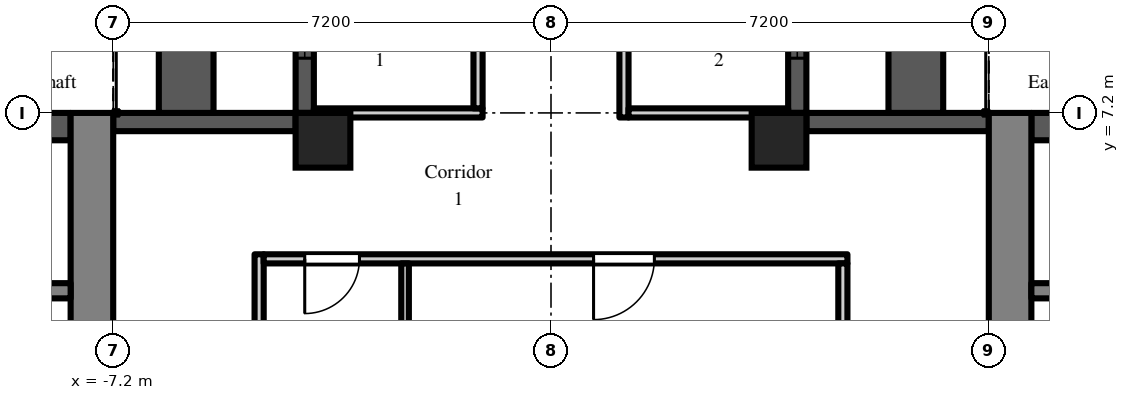
"""IFC4 building model, lengths in metres.
Left out: names, types, materials, properties, quantities, classifications, styles, units other than length and angle.
Written with IfcOpenShell. Run it as: python <this file> out.ifc"""

import sys

from ifc_helpers import new_model, si_unit, direction, frame, frame_2d, origin, origin_2d, place, context, subcontext, project, spatial, rectangle, extrude, element, fill, save


model = new_model("IFC4")
c1 = context("Model", 3, precision=1e-05, world=origin(), true_north=direction((0.0, 1.0)))
c2 = subcontext(c1, "Body", "Model", "MODEL_VIEW")
j1 = project(units=[si_unit("LENGTHUNIT", "METRE"), si_unit("PLANEANGLEUNIT", "RADIAN")], contexts=[c1])
p1 = place(None, origin())
s1 = spatial("IfcSite", under=j1, at=p1, CompositionType="ELEMENT")
p2 = place(p1, origin())
s2 = spatial("IfcBuilding", under=s1, at=p2, CompositionType="ELEMENT")
p3 = place(p2, frame((0.0, 0.0, 147.3)))
s3 = spatial("IfcBuildingStorey", under=s2, at=p3, CompositionType="ELEMENT", Elevation=147.3)
for number, where, z_axis, x_axis in (
    (1, (-3.75, 6.75, 0.0), (0.0, 0.0, 1.0), (1.0, 0.0, 0.0)),
    (2, (3.75, 6.75, 0.0), (0.0, 0.0, 1.0), (1.0, 0.0, 0.0)),
):
    element("IfcColumn", number, at=place(p3, frame(where, z_axis=z_axis, x_axis=x_axis)), inside=s3, PredefinedType="COLUMN", context=c2, shape_type="SweptSolid", body=[
        extrude(rectangle(XDim=0.9, YDim=0.9, at=origin_2d()), origin(), (0.0, 0.0, 1.0), 3.0),
    ])
p4 = place(p3, frame((7.2, 7.05, 0.0), z_axis=(0.0, 0.0, 1.0), x_axis=(-1.0, 0.0, 0.0)))
e3 = element("IfcWall", 3, at=p4, inside=s3, PredefinedType="SOLIDWALL", context=c2, shape_type="SweptSolid", body=[
    extrude(rectangle(XDim=3.0, YDim=0.3, at=frame_2d((1.5, 0.0))), origin(), (0.0, 0.0, 1.0), 2.2),
])
p5 = place(p3, frame((4.05, 7.2, 0.0), z_axis=(0.0, 0.0, 1.0), x_axis=(0.0, 1.0, 0.0)))
e4 = element("IfcWall", 4, at=p5, inside=s3, PredefinedType="SOLIDWALL", context=c2, shape_type="SweptSolid", body=[
    extrude(rectangle(XDim=7.2, YDim=0.3, at=frame_2d((3.6, 0.0))), origin(), (0.0, 0.0, 1.0), 2.2),
])
p6 = place(p5, frame((3.0, 0.0, 0.0)))
e5 = element("IfcOpeningElement", 5, at=p6, cuts=e4, PredefinedType="OPENING", context=c2, shape_type="SweptSolid", body=[
    extrude(rectangle(XDim=1.2, YDim=2.05, at=frame_2d((0.6, 1.025))), frame((0.0, 0.16, 0.0), z_axis=(0.0, -1.0, 0.0), x_axis=(1.0, 0.0, 0.0)), (0.0, 0.0, 1.0), 0.32),
])
p7 = place(p5, frame((0.9, 0.0, 0.2)))
e6 = element("IfcOpeningElement", 6, at=p7, cuts=e4, PredefinedType="OPENING", context=c2, shape_type="SweptSolid", body=[
    extrude(rectangle(XDim=1.8, YDim=1.85, at=frame_2d((0.9, 0.925))), frame((0.0, 0.16, 0.0), z_axis=(0.0, -1.0, 0.0), x_axis=(1.0, 0.0, 0.0)), (0.0, 0.0, 1.0), 0.32),
])
p8 = place(p5, frame((4.5, 0.0, 0.2)))
e7 = element("IfcOpeningElement", 7, at=p8, cuts=e4, PredefinedType="OPENING", context=c2, shape_type="SweptSolid", body=[
    extrude(rectangle(XDim=1.8, YDim=1.85, at=frame_2d((0.9, 0.925))), frame((0.0, 0.16, 0.0), z_axis=(0.0, -1.0, 0.0), x_axis=(1.0, 0.0, 0.0)), (0.0, 0.0, 1.0), 0.32),
])
p9 = place(p3, frame((-4.05, 14.4, 0.0), z_axis=(0.0, 0.0, 1.0), x_axis=(0.0, -1.0, 0.0)))
e8 = element("IfcWall", 8, at=p9, inside=s3, PredefinedType="SOLIDWALL", context=c2, shape_type="SweptSolid", body=[
    extrude(rectangle(XDim=7.2, YDim=0.3, at=frame_2d((3.6, 0.0))), origin(), (0.0, 0.0, 1.0), 2.2),
])
p10 = place(p9, frame((3.0, 0.0, 0.0)))
e9 = element("IfcOpeningElement", 9, at=p10, cuts=e8, PredefinedType="OPENING", context=c2, shape_type="SweptSolid", body=[
    extrude(rectangle(XDim=1.2, YDim=2.05, at=frame_2d((0.6, 1.025))), frame((0.0, 0.16, 0.0), z_axis=(0.0, -1.0, 0.0), x_axis=(1.0, 0.0, 0.0)), (0.0, 0.0, 1.0), 0.32),
])
p11 = place(p9, frame((0.9, 0.0, 0.2)))
e10 = element("IfcOpeningElement", 10, at=p11, cuts=e8, PredefinedType="OPENING", context=c2, shape_type="SweptSolid", body=[
    extrude(rectangle(XDim=1.8, YDim=1.85, at=frame_2d((0.9, 0.925))), frame((0.0, 0.16, 0.0), z_axis=(0.0, -1.0, 0.0), x_axis=(1.0, 0.0, 0.0)), (0.0, 0.0, 1.0), 0.32),
])
p12 = place(p9, frame((4.5, 0.0, 0.2)))
e11 = element("IfcOpeningElement", 11, at=p12, cuts=e8, PredefinedType="OPENING", context=c2, shape_type="SweptSolid", body=[
    extrude(rectangle(XDim=1.8, YDim=1.85, at=frame_2d((0.9, 0.925))), frame((0.0, 0.16, 0.0), z_axis=(0.0, -1.0, 0.0), x_axis=(1.0, 0.0, 0.0)), (0.0, 0.0, 1.0), 0.32),
])
p13 = place(p3, frame((-4.2, 7.05, 0.0), z_axis=(0.0, 0.0, 1.0), x_axis=(-1.0, 0.0, 0.0)))
e12 = element("IfcWall", 12, at=p13, inside=s3, PredefinedType="SOLIDWALL", context=c2, shape_type="SweptSolid", body=[
    extrude(rectangle(XDim=3.0, YDim=0.3, at=frame_2d((1.5, 0.0))), origin(), (0.0, 0.0, 1.0), 2.2),
])
for number, where, z_axis, x_axis in (
    (13, (6.0, 7.2, 0.0), (0.0, 0.0, 1.0), (0.0, 1.0, 0.0)),
    (14, (-6.0, 7.2, 0.0), (0.0, 0.0, 1.0), (0.0, 1.0, 0.0)),
):
    element("IfcWall", number, at=place(p3, frame(where, z_axis=z_axis, x_axis=x_axis)), inside=s3, PredefinedType="PARAPET", context=c2, shape_type="SweptSolid", body=[
        extrude(rectangle(XDim=7.2, YDim=0.9, at=frame_2d((3.6, 0.0))), origin(), (0.0, 0.0, 1.0), 0.8),
    ])
p14 = place(p3, frame((7.55, -7.2, 0.0), z_axis=(0.0, 0.0, 1.0), x_axis=(0.0, 1.0, 0.0)))
e15 = element("IfcWall", 15, at=p14, inside=s3, PredefinedType="SHEAR", context=c2, shape_type="SweptSolid", body=[
    extrude(rectangle(XDim=14.4, YDim=0.7, at=frame_2d((7.2, 0.0))), origin(), (0.0, 0.0, 1.0), 2.6),
])
p15 = place(p14, frame((6.0, 0.0, 0.0)))
e16 = element("IfcOpeningElement", 16, at=p15, cuts=e15, PredefinedType="OPENING", context=c2, shape_type="SweptSolid", body=[
    extrude(rectangle(XDim=2.4, YDim=2.2, at=frame_2d((1.2, 1.1))), frame((0.0, 0.36, 0.0), z_axis=(0.0, -1.0, 0.0), x_axis=(1.0, 0.0, 0.0)), (0.0, 0.0, 1.0), 0.72),
])
p16 = place(p3, frame((7.9, 6.975, 0.0), z_axis=(0.0, 0.0, 1.0), x_axis=(1.0, 0.0, 0.0)))
e17 = element("IfcWall", 17, at=p16, inside=s3, PredefinedType="SHEAR", context=c2, shape_type="SweptSolid", body=[
    extrude(rectangle(XDim=12.95, YDim=0.45, at=frame_2d((6.475, 0.0))), origin(), (0.0, 0.0, 1.0), 2.6),
])
p17 = place(p3, frame((7.9, 4.275, 0.0), z_axis=(0.0, 0.0, 1.0), x_axis=(1.0, 0.0, 0.0)))
e18 = element("IfcWall", 18, at=p17, inside=s3, PredefinedType="SHEAR", context=c2, shape_type="SweptSolid", body=[
    extrude(rectangle(XDim=1.95, YDim=0.25, at=frame_2d((0.975, 0.0))), origin(), (0.0, 0.0, 1.0), 2.6),
])
p18 = place(p3, frame((-7.55, -7.2, 0.0), z_axis=(0.0, 0.0, 1.0), x_axis=(0.0, 1.0, 0.0)))
e19 = element("IfcWall", 19, at=p18, inside=s3, PredefinedType="SHEAR", context=c2, shape_type="SweptSolid", body=[
    extrude(rectangle(XDim=14.4, YDim=0.7, at=frame_2d((7.2, 0.0))), origin(), (0.0, 0.0, 1.0), 2.6),
])
p19 = place(p18, frame((6.0, 0.0, 0.0)))
e20 = element("IfcOpeningElement", 20, at=p19, cuts=e19, PredefinedType="OPENING", context=c2, shape_type="SweptSolid", body=[
    extrude(rectangle(XDim=2.4, YDim=2.2, at=frame_2d((1.2, 1.1))), frame((0.0, 0.36, 0.0), z_axis=(0.0, -1.0, 0.0), x_axis=(1.0, 0.0, 0.0)), (0.0, 0.0, 1.0), 0.72),
])
p20 = place(p3, frame((-7.9, 6.975, 0.0), z_axis=(0.0, 0.0, 1.0), x_axis=(-1.0, 0.0, 0.0)))
e21 = element("IfcWall", 21, at=p20, inside=s3, PredefinedType="SHEAR", context=c2, shape_type="SweptSolid", body=[
    extrude(rectangle(XDim=12.95, YDim=0.45, at=frame_2d((6.475, 0.0))), origin(), (0.0, 0.0, 1.0), 2.6),
])
p21 = place(p3, frame((-7.9, 4.275, 0.0), z_axis=(0.0, 0.0, 1.0), x_axis=(-1.0, 0.0, 0.0)))
e22 = element("IfcWall", 22, at=p21, inside=s3, PredefinedType="SHEAR", context=c2, shape_type="SweptSolid", body=[
    extrude(rectangle(XDim=1.95, YDim=0.25, at=frame_2d((0.975, 0.0))), origin(), (0.0, 0.0, 1.0), 2.6),
])
p22 = place(p3, frame((-4.8, -4.875, 0.0), z_axis=(0.0, 0.0, 1.0), x_axis=(0.0, 1.0, 0.0)))
e23 = element("IfcWall", 23, at=p22, inside=s3, PredefinedType="PARTITIONING", context=c2, shape_type="SweptSolid", body=[
    extrude(rectangle(XDim=9.75, YDim=0.15, at=frame_2d((4.875, 0.0))), origin(), (0.0, 0.0, 1.0), 2.6),
])
p23 = place(p22, frame((5.625, 0.0, 0.0)))
e24 = element("IfcOpeningElement", 24, at=p23, cuts=e23, PredefinedType="OPENING", context=c2, shape_type="SweptSolid", body=[
    extrude(rectangle(XDim=0.9, YDim=2.1, at=frame_2d((0.45, 1.05))), frame((0.0, 0.085, 0.0), z_axis=(0.0, -1.0, 0.0), x_axis=(1.0, 0.0, 0.0)), (0.0, 0.0, 1.0), 0.17),
])
p24 = place(p22, frame((2.025, 0.0, 0.0)))
e25 = element("IfcOpeningElement", 25, at=p24, cuts=e23, PredefinedType="OPENING", context=c2, shape_type="SweptSolid", body=[
    extrude(rectangle(XDim=0.9, YDim=2.1, at=frame_2d((0.45, 1.05))), frame((0.0, 0.085, 0.0), z_axis=(0.0, -1.0, 0.0), x_axis=(1.0, 0.0, 0.0)), (0.0, 0.0, 1.0), 0.17),
])
p25 = place(p3, frame((-4.725, 4.8, 0.0), z_axis=(0.0, 0.0, 1.0), x_axis=(1.0, 0.0, 0.0)))
e26 = element("IfcWall", 26, at=p25, inside=s3, PredefinedType="PARTITIONING", context=c2, shape_type="SweptSolid", body=[
    extrude(rectangle(XDim=9.6, YDim=0.15, at=frame_2d((4.8, 0.0))), origin(), (0.0, 0.0, 1.0), 2.6),
])
p26 = place(p25, frame((0.675, 0.0, 0.0)))
e27 = element("IfcOpeningElement", 27, at=p26, cuts=e26, PredefinedType="OPENING", context=c2, shape_type="SweptSolid", body=[
    extrude(rectangle(XDim=0.9, YDim=2.1, at=frame_2d((0.45, 1.05))), frame((0.0, 0.085, 0.0), z_axis=(0.0, -1.0, 0.0), x_axis=(1.0, 0.0, 0.0)), (0.0, 0.0, 1.0), 0.17),
])
p27 = place(p25, frame((5.425, 0.0, 0.0)))
e28 = element("IfcOpeningElement", 28, at=p27, cuts=e26, PredefinedType="OPENING", context=c2, shape_type="SweptSolid", body=[
    extrude(rectangle(XDim=1.0, YDim=2.1, at=frame_2d((0.5, 1.05))), frame((0.0, 0.085, 0.0), z_axis=(0.0, -1.0, 0.0), x_axis=(1.0, 0.0, 0.0)), (0.0, 0.0, 1.0), 0.17),
])
p28 = place(p3, frame((-3.9, 7.2, 0.0), z_axis=(0.0, 0.0, 1.0), x_axis=(1.0, 0.0, 0.0)))
e29 = element("IfcWall", 29, at=p28, inside=s3, PredefinedType="PARTITIONING", context=c2, shape_type="SweptSolid", body=[
    extrude(rectangle(XDim=2.775, YDim=0.15, at=frame_2d((1.387, 0.0))), origin(), (0.0, 0.0, 1.0), 2.6),
])
p29 = place(p3, frame((-2.4, 0.075, 0.0), z_axis=(0.0, 0.0, 1.0), x_axis=(0.0, 1.0, 0.0)))
e30 = element("IfcWall", 30, at=p29, inside=s3, PredefinedType="PARTITIONING", context=c2, shape_type="SweptSolid", body=[
    extrude(rectangle(XDim=4.65, YDim=0.125, at=frame_2d((2.325, 0.0))), origin(), (0.0, 0.0, 1.0), 2.6),
])
p30 = place(p3, frame((-1.2, 7.275, 0.0), z_axis=(0.0, 0.0, 1.0), x_axis=(0.0, 1.0, 0.0)))
e31 = element("IfcWall", 31, at=p30, inside=s3, PredefinedType="PARTITIONING", context=c2, shape_type="SweptSolid", body=[
    extrude(rectangle(XDim=10.65, YDim=0.15, at=frame_2d((5.325, 0.0))), origin(), (0.0, 0.0, 1.0), 2.6),
])
p31 = place(p30, frame((5.275, 0.0, 0.0)))
e32 = element("IfcOpeningElement", 32, at=p31, cuts=e31, PredefinedType="OPENING", context=c2, shape_type="SweptSolid", body=[
    extrude(rectangle(XDim=0.9, YDim=2.1, at=frame_2d((0.45, 1.05))), frame((0.0, 0.085, 0.0), z_axis=(0.0, -1.0, 0.0), x_axis=(1.0, 0.0, 0.0)), (0.0, 0.0, 1.0), 0.17),
])
p32 = place(p30, frame((1.675, 0.0, 0.0)))
e33 = element("IfcOpeningElement", 33, at=p32, cuts=e31, PredefinedType="OPENING", context=c2, shape_type="SweptSolid", body=[
    extrude(rectangle(XDim=0.9, YDim=2.1, at=frame_2d((0.45, 1.05))), frame((0.0, 0.085, 0.0), z_axis=(0.0, -1.0, 0.0), x_axis=(1.0, 0.0, 0.0)), (0.0, 0.0, 1.0), 0.17),
])
p33 = place(p30, frame((7.725, 0.0, 0.0)))
e34 = element("IfcOpeningElement", 34, at=p33, cuts=e31, PredefinedType="OPENING", context=c2, shape_type="SweptSolid", body=[
    extrude(rectangle(XDim=1.0, YDim=2.1, at=frame_2d((0.5, 1.05))), frame((0.0, 0.085, 0.0), z_axis=(0.0, -1.0, 0.0), x_axis=(1.0, 0.0, 0.0)), (0.0, 0.0, 1.0), 0.17),
])
p34 = place(p3, frame((1.2, 7.125, 0.0), z_axis=(0.0, 0.0, 1.0), x_axis=(0.0, 1.0, 0.0)))
e35 = element("IfcWall", 35, at=p34, inside=s3, PredefinedType="PARTITIONING", context=c2, shape_type="SweptSolid", body=[
    extrude(rectangle(XDim=10.8, YDim=0.15, at=frame_2d((5.4, 0.0))), origin(), (0.0, 0.0, 1.0), 2.6),
])
p35 = place(p34, frame((5.425, 0.0, 0.0)))
e36 = element("IfcOpeningElement", 36, at=p35, cuts=e35, PredefinedType="OPENING", context=c2, shape_type="SweptSolid", body=[
    extrude(rectangle(XDim=0.9, YDim=2.1, at=frame_2d((0.45, 1.05))), frame((0.0, 0.085, 0.0), z_axis=(0.0, -1.0, 0.0), x_axis=(1.0, 0.0, 0.0)), (0.0, 0.0, 1.0), 0.17),
])
p36 = place(p34, frame((1.825, 0.0, 0.0)))
e37 = element("IfcOpeningElement", 37, at=p36, cuts=e35, PredefinedType="OPENING", context=c2, shape_type="SweptSolid", body=[
    extrude(rectangle(XDim=0.9, YDim=2.1, at=frame_2d((0.45, 1.05))), frame((0.0, 0.085, 0.0), z_axis=(0.0, -1.0, 0.0), x_axis=(1.0, 0.0, 0.0)), (0.0, 0.0, 1.0), 0.17),
])
p37 = place(p34, frame((7.475, 0.0, 0.0)))
e38 = element("IfcOpeningElement", 38, at=p37, cuts=e35, PredefinedType="OPENING", context=c2, shape_type="SweptSolid", body=[
    extrude(rectangle(XDim=1.0, YDim=2.1, at=frame_2d((0.5, 1.05))), frame((0.0, 0.085, 0.0), z_axis=(0.0, -1.0, 0.0), x_axis=(1.0, 0.0, 0.0)), (0.0, 0.0, 1.0), 0.17),
])
p38 = place(p3, frame((1.275, 7.2, 0.0), z_axis=(0.0, 0.0, 1.0), x_axis=(1.0, 0.0, 0.0)))
e39 = element("IfcWall", 39, at=p38, inside=s3, PredefinedType="PARTITIONING", context=c2, shape_type="SweptSolid", body=[
    extrude(rectangle(XDim=2.625, YDim=0.15, at=frame_2d((1.312, 0.0))), origin(), (0.0, 0.0, 1.0), 2.6),
])
p39 = place(p3, frame((4.8, -4.725, 0.0), z_axis=(0.0, 0.0, 1.0), x_axis=(0.0, 1.0, 0.0)))
e40 = element("IfcWall", 40, at=p39, inside=s3, PredefinedType="PARTITIONING", context=c2, shape_type="SweptSolid", body=[
    extrude(rectangle(XDim=9.45, YDim=0.15, at=frame_2d((4.725, 0.0))), origin(), (0.0, 0.0, 1.0), 2.6),
])
p40 = place(p7, origin())
e41 = element("IfcWindow", 41, at=p40, inside=s3, PartitioningType="SINGLE_PANEL", PredefinedType="WINDOW", context=c2, shape_type="SweptSolid", body=[
    extrude(rectangle(XDim=1.8, YDim=1.85, at=frame_2d((0.9, 0.925))), frame((0.0, 0.03, 0.0), z_axis=(0.0, -1.0, 0.0), x_axis=(1.0, 0.0, 0.0)), (0.0, 0.0, 1.0), 0.06),
])
fill(e6, e41)
p41 = place(p12, origin())
e42 = element("IfcWindow", 42, at=p41, inside=s3, PartitioningType="SINGLE_PANEL", PredefinedType="WINDOW", context=c2, shape_type="SweptSolid", body=[
    extrude(rectangle(XDim=1.8, YDim=1.85, at=frame_2d((0.9, 0.925))), frame((0.0, 0.03, 0.0), z_axis=(0.0, -1.0, 0.0), x_axis=(1.0, 0.0, 0.0)), (0.0, 0.0, 1.0), 0.06),
])
fill(e11, e42)
p42 = place(p26, frame((0.9, 0.0, 0.0), z_axis=(0.0, 0.0, 1.0), x_axis=(-1.0, 0.0, 0.0)))
e43 = element("IfcDoor", 43, at=p42, inside=s3, OperationType="SINGLE_SWING_RIGHT", PredefinedType="DOOR", context=c2, shape_type="SweptSolid", body=[
    extrude(rectangle(XDim=0.9, YDim=2.1, at=frame_2d((0.45, 1.05))), frame((0.0, 0.025, 0.0), z_axis=(0.0, -1.0, 0.0), x_axis=(1.0, 0.0, 0.0)), (0.0, 0.0, 1.0), 0.05),
])
fill(e27, e43)
p43 = place(p27, frame((1.0, 0.0, 0.0), z_axis=(0.0, 0.0, 1.0), x_axis=(-1.0, 0.0, 0.0)))
e44 = element("IfcDoor", 44, at=p43, inside=s3, OperationType="SINGLE_SWING_RIGHT", PredefinedType="DOOR", context=c2, shape_type="SweptSolid", body=[
    extrude(rectangle(XDim=1.0, YDim=2.1, at=frame_2d((0.5, 1.05))), frame((0.0, 0.025, 0.0), z_axis=(0.0, -1.0, 0.0), x_axis=(1.0, 0.0, 0.0)), (0.0, 0.0, 1.0), 0.05),
])
fill(e28, e44)
save(model, sys.argv[1])
